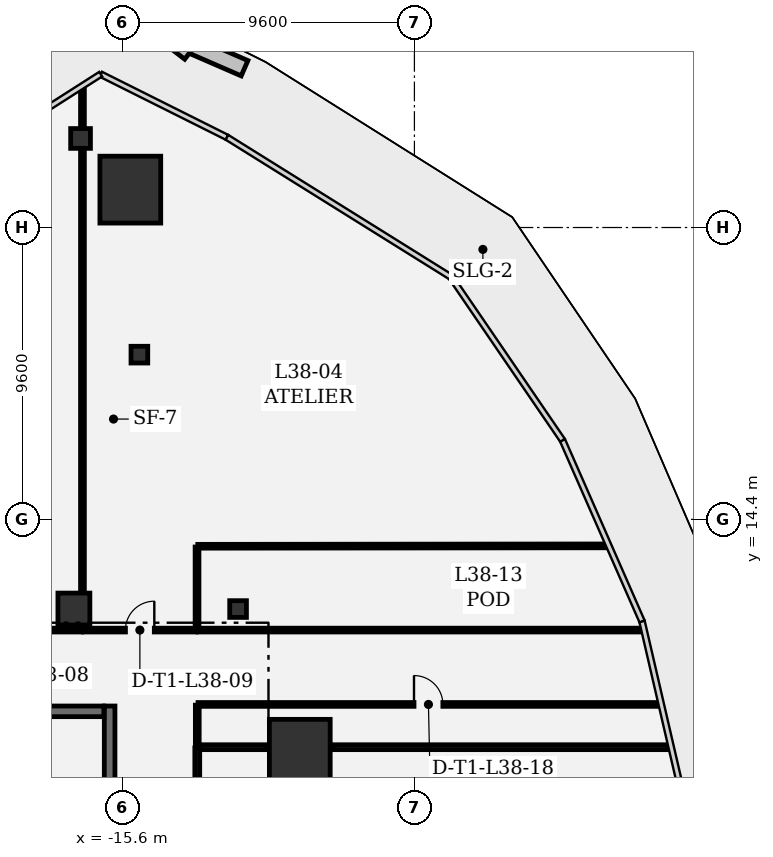
"""IFC4 building model, lengths in metres.
Left out: names, types, materials, properties, quantities, classifications, styles, units other than length and angle.
Written with IfcOpenShell. Run it as: python <this file> out.ifc"""

import sys

from ifc_helpers import new_model, si_unit, direction, frame, frame_2d, origin, origin_2d, place, context, subcontext, project, spatial, rectangle, extrude, element, fill, save


model = new_model("IFC4")
c1 = context("Model", 3, precision=1e-05, world=origin(), true_north=direction((0.0, 1.0)))
c2 = subcontext(c1, "Body", "Model", "MODEL_VIEW")
j1 = project(units=[si_unit("LENGTHUNIT", "METRE"), si_unit("PLANEANGLEUNIT", "RADIAN")], contexts=[c1])
p1 = place(None, origin())
s1 = spatial("IfcSite", under=j1, at=p1, CompositionType="ELEMENT")
p2 = place(p1, origin())
s2 = spatial("IfcBuilding", under=s1, at=p2, CompositionType="ELEMENT")
p3 = place(p2, frame((0.0, 0.0, 166.5)))
s3 = spatial("IfcBuildingStorey", under=s2, at=p3, CompositionType="ELEMENT", Elevation=166.5)
for number, where, z_axis, x_axis in (
    (1, (-9.77, 6.721, 0.0), (0.0, 0.0, 1.0), (1.0, 0.0, 0.0)),
    (2, (-15.344, 25.246, 0.0), (0.0, 0.0, 1.0), (1.0, 0.0, 0.0)),
):
    element("IfcColumn", number, at=place(p3, frame(where, z_axis=z_axis, x_axis=x_axis)), inside=s3, PredefinedType="COLUMN", context=c2, shape_type="SweptSolid", body=[
        extrude(rectangle(XDim=2.0, YDim=2.2, at=origin_2d()), origin(), (0.0, 0.0, 1.0), 4.05),
    ])
p4 = place(p3, frame((-17.2, 11.45, 0.0), z_axis=(0.0, 0.0, 1.0), x_axis=(1.0, 0.0, 0.0)))
e3 = element("IfcColumn", 3, at=p4, inside=s3, PredefinedType="COLUMN", context=c2, shape_type="SweptSolid", body=[
    extrude(rectangle(XDim=1.05, YDim=1.05, at=origin_2d()), origin(), (0.0, 0.0, 1.0), 4.05),
])
p5 = place(p3, frame((-16.981, 26.929, 0.0), z_axis=(0.0, 0.0, 1.0), x_axis=(1.0, 0.0, 0.0)))
e4 = element("IfcColumn", 4, at=p5, inside=s3, PredefinedType="COLUMN", context=c2, shape_type="SweptSolid", body=[
    extrude(rectangle(XDim=0.65, YDim=0.65, at=origin_2d()), origin(), (0.0, 0.0, 1.0), 4.05),
])
for number, where, z_axis, x_axis in (
    (5, (-15.046, 19.818, 0.0), (0.0, 0.0, 1.0), (1.0, 0.0, 0.0)),
    (6, (-11.8, 11.45, 0.0), (0.0, 0.0, 1.0), (1.0, 0.0, 0.0)),
):
    element("IfcColumn", number, at=place(p3, frame(where, z_axis=z_axis, x_axis=x_axis)), inside=s3, PredefinedType="COLUMN", context=c2, shape_type="SweptSolid", body=[
        extrude(rectangle(XDim=0.55, YDim=0.55, at=origin_2d()), origin(), (0.0, 0.0, 1.0), 4.05),
    ])
p6 = place(p3, frame((-16.025, 4.05, 0.0), z_axis=(0.0, 0.0, 1.0), x_axis=(0.0, 1.0, 0.0)))
e7 = element("IfcWall", 7, at=p6, inside=s3, PredefinedType="SHEAR", context=c2, shape_type="SweptSolid", body=[
    extrude(rectangle(XDim=4.21, YDim=0.35, at=frame_2d((2.105, 0.0))), origin(), (0.0, 0.0, 1.0), 3.78),
])
p7 = place(p3, frame((-16.215, 8.085, 0.0), z_axis=(0.0, 0.0, 1.0), x_axis=(-1.0, 0.0, 0.0)))
e8 = element("IfcWall", 8, at=p7, inside=s3, PredefinedType="SHEAR", context=c2, shape_type="SweptSolid", body=[
    extrude(rectangle(XDim=8.12, YDim=0.35, at=frame_2d((4.06, 0.0))), origin(), (0.0, 0.0, 1.0), 3.78),
])
p8 = place(p7, frame((6.74, 0.0, 0.0)))
e9 = element("IfcOpeningElement", 9, at=p8, cuts=e8, PredefinedType="OPENING", context=c2, shape_type="SweptSolid", body=[
    extrude(rectangle(XDim=1.1, YDim=2.2, at=frame_2d((0.55, 1.1))), frame((0.0, 0.185, 0.0), z_axis=(0.0, -1.0, 0.0), x_axis=(1.0, 0.0, 0.0)), (0.0, 0.0, 1.0), 0.37),
])
p9 = place(p3, frame((-20.466, 10.758, 0.0), z_axis=(0.0, 0.0, 1.0), x_axis=(1.0, 0.0, 0.0)))
e10 = element("IfcWall", 10, at=p9, inside=s3, PredefinedType="PARTITIONING", context=c2, shape_type="SweptSolid", body=[
    extrude(rectangle(XDim=3.523, YDim=0.125, at=frame_2d((1.761, 0.0))), origin(), (0.0, 0.0, 1.0), 3.78),
])
p10 = place(p9, frame((1.286, 0.0, 0.0)))
e11 = element("IfcOpeningElement", 11, at=p10, cuts=e10, PredefinedType="OPENING", context=c2, shape_type="SweptSolid", body=[
    extrude(rectangle(XDim=0.95, YDim=2.15, at=frame_2d((0.475, 1.075))), frame((0.0, 0.073, 0.0), z_axis=(0.0, -1.0, 0.0), x_axis=(1.0, 0.0, 0.0)), (0.0, 0.0, 1.0), 0.145),
])
p11 = place(p3, frame((-16.919, 12.04, 0.0), z_axis=(0.0, 0.0, 1.0), x_axis=(0.0, 1.0, 0.0)))
e12 = element("IfcWall", 12, at=p11, inside=s3, PredefinedType="PARTITIONING", context=c2, shape_type="SweptSolid", body=[
    extrude(rectangle(XDim=14.499, YDim=0.125, at=frame_2d((7.25, 0.0))), origin(), (0.0, 0.0, 1.0), 2.895),
])
p12 = place(p3, frame((-16.919, 27.319, 0.0), z_axis=(0.0, 0.0, 1.0), x_axis=(0.0, 1.0, 0.0)))
e13 = element("IfcWall", 13, at=p12, inside=s3, PredefinedType="PARTITIONING", context=c2, shape_type="SweptSolid", body=[
    extrude(rectangle(XDim=1.261, YDim=0.125, at=frame_2d((0.631, 0.0))), origin(), (0.0, 0.0, 1.0), 3.78),
])
p13 = place(p3, frame((-16.885, 10.758, 0.0), z_axis=(0.0, 0.0, 1.0), x_axis=(1.0, 0.0, 0.0)))
e14 = element("IfcWall", 14, at=p13, inside=s3, PredefinedType="PARTITIONING", context=c2, shape_type="SweptSolid", body=[
    extrude(rectangle(XDim=3.711, YDim=0.125, at=frame_2d((1.855, 0.0))), origin(), (0.0, 0.0, 1.0), 2.895),
])
p14 = place(p13, frame((1.38, 0.0, 0.0)))
e15 = element("IfcOpeningElement", 15, at=p14, cuts=e14, PredefinedType="OPENING", context=c2, shape_type="SweptSolid", body=[
    extrude(rectangle(XDim=0.95, YDim=2.15, at=frame_2d((0.475, 1.075))), frame((0.0, 0.073, 0.0), z_axis=(0.0, -1.0, 0.0), x_axis=(1.0, 0.0, 0.0)), (0.0, 0.0, 1.0), 0.145),
])
p15 = place(p3, frame((-13.15, 13.49, 0.0), z_axis=(0.0, 0.0, 1.0), x_axis=(0.0, -1.0, 0.0)))
e16 = element("IfcWall", 16, at=p15, inside=s3, PredefinedType="PARTITIONING", context=c2, shape_type="SweptSolid", body=[
    extrude(rectangle(XDim=2.707, YDim=0.125, at=frame_2d((1.354, 0.0))), origin(), (0.0, 0.0, 1.0), 3.78),
])
p16 = place(p3, frame((-13.125, 13.515, 0.0), z_axis=(0.0, 0.0, 1.0), x_axis=(0.999999553983, 0.000944475304, 0.0)))
e17 = element("IfcWall", 17, at=p16, inside=s3, PredefinedType="PARTITIONING", context=c2, shape_type="SweptSolid", body=[
    extrude(rectangle(XDim=13.442, YDim=0.125, at=frame_2d((6.721, 0.0))), origin(), (0.0, 0.0, 1.0), 3.344),
])
p17 = place(p3, frame((2.366, 6.905, 0.0), z_axis=(0.0, 0.0, 1.0), x_axis=(-1.0, 0.0, 0.0)))
e18 = element("IfcWall", 18, at=p17, inside=s3, PredefinedType="PARTITIONING", context=c2, shape_type="SweptSolid", body=[
    extrude(rectangle(XDim=11.072, YDim=0.16, at=frame_2d((5.536, 0.0))), origin(), (0.0, 0.0, 1.0), 3.78),
])
p18 = place(p3, frame((-10.835, 6.905, 0.0), z_axis=(0.0, 0.0, 1.0), x_axis=(-1.0, 0.0, 0.0)))
e19 = element("IfcWall", 19, at=p18, inside=s3, PredefinedType="PARTITIONING", context=c2, shape_type="SweptSolid", body=[
    extrude(rectangle(XDim=2.282, YDim=0.16, at=frame_2d((1.141, 0.0))), origin(), (0.0, 0.0, 1.0), 3.78),
])
p19 = place(p3, frame((-13.142, 6.88, 0.0), z_axis=(0.0, 0.0, 1.0), x_axis=(0.0, -1.0, 0.0)))
e20 = element("IfcWall", 20, at=p19, inside=s3, PredefinedType="PARTITIONING", context=c2, shape_type="SweptSolid", body=[
    extrude(rectangle(XDim=7.636, YDim=0.16, at=frame_2d((3.818, 0.0))), origin(), (0.0, 0.0, 1.0), 3.78),
])
p20 = place(p19, frame((3.268, 0.0, 0.0)))
e21 = element("IfcOpeningElement", 21, at=p20, cuts=e20, PredefinedType="OPENING", context=c2, shape_type="SweptSolid", body=[
    extrude(rectangle(XDim=1.1, YDim=2.15, at=frame_2d((0.55, 1.075))), frame((0.0, 0.09, 0.0), z_axis=(0.0, -1.0, 0.0), x_axis=(1.0, 0.0, 0.0)), (0.0, 0.0, 1.0), 0.18),
])
p21 = place(p3, frame((1.473, 10.758, 0.0), z_axis=(0.0, 0.0, 1.0), x_axis=(-1.0, 0.0, 0.0)))
e22 = element("IfcWall", 22, at=p21, inside=s3, PredefinedType="PARTITIONING", context=c2, shape_type="SweptSolid", body=[
    extrude(rectangle(XDim=14.59, YDim=0.125, at=frame_2d((7.295, 0.0))), origin(), (0.0, 0.0, 1.0), 3.78),
])
p22 = place(p3, frame((-13.117, 8.312, 0.0), z_axis=(0.0, 0.0, 1.0), x_axis=(1.0, 0.0, 0.0)))
e23 = element("IfcWall", 23, at=p22, inside=s3, PredefinedType="PARTITIONING", context=c2, shape_type="SweptSolid", body=[
    extrude(rectangle(XDim=15.157, YDim=0.125, at=frame_2d((7.579, 0.0))), origin(), (0.0, 0.0, 1.0), 2.895),
])
p23 = place(p22, frame((7.104, 0.0, 0.0)))
e24 = element("IfcOpeningElement", 24, at=p23, cuts=e23, PredefinedType="OPENING", context=c2, shape_type="SweptSolid", body=[
    extrude(rectangle(XDim=0.95, YDim=2.15, at=frame_2d((0.475, 1.075))), frame((0.0, 0.073, 0.0), z_axis=(0.0, -1.0, 0.0), x_axis=(1.0, 0.0, 0.0)), (0.0, 0.0, 1.0), 0.145),
])
p24 = place(p3, frame((-13.142, 8.287, 0.0), z_axis=(0.0, 0.0, 1.0), x_axis=(0.0, -1.0, 0.0)))
e25 = element("IfcWall", 25, at=p24, inside=s3, PredefinedType="PARTITIONING", context=c2, shape_type="SweptSolid", body=[
    extrude(rectangle(XDim=1.349, YDim=0.125, at=frame_2d((0.674, 0.0))), origin(), (0.0, 0.0, 1.0), 3.78),
])
p25 = place(p14, origin())
e26 = element("IfcDoor", 26, at=p25, inside=s3, OperationType="SINGLE_SWING_RIGHT", PredefinedType="DOOR", context=c2, shape_type="SweptSolid", body=[
    extrude(rectangle(XDim=0.95, YDim=2.15, at=frame_2d((0.475, 1.075))), frame((0.0, 0.025, 0.0), z_axis=(0.0, -1.0, 0.0), x_axis=(1.0, 0.0, 0.0)), (0.0, 0.0, 1.0), 0.05),
])
fill(e15, e26)
p26 = place(p23, origin())
e27 = element("IfcDoor", 27, at=p26, inside=s3, OperationType="SINGLE_SWING_LEFT", PredefinedType="DOOR", context=c2, shape_type="SweptSolid", body=[
    extrude(rectangle(XDim=0.95, YDim=2.15, at=frame_2d((0.475, 1.075))), frame((0.0, 0.025, 0.0), z_axis=(0.0, -1.0, 0.0), x_axis=(1.0, 0.0, 0.0)), (0.0, 0.0, 1.0), 0.05),
])
fill(e24, e27)
save(model, sys.argv[1])
